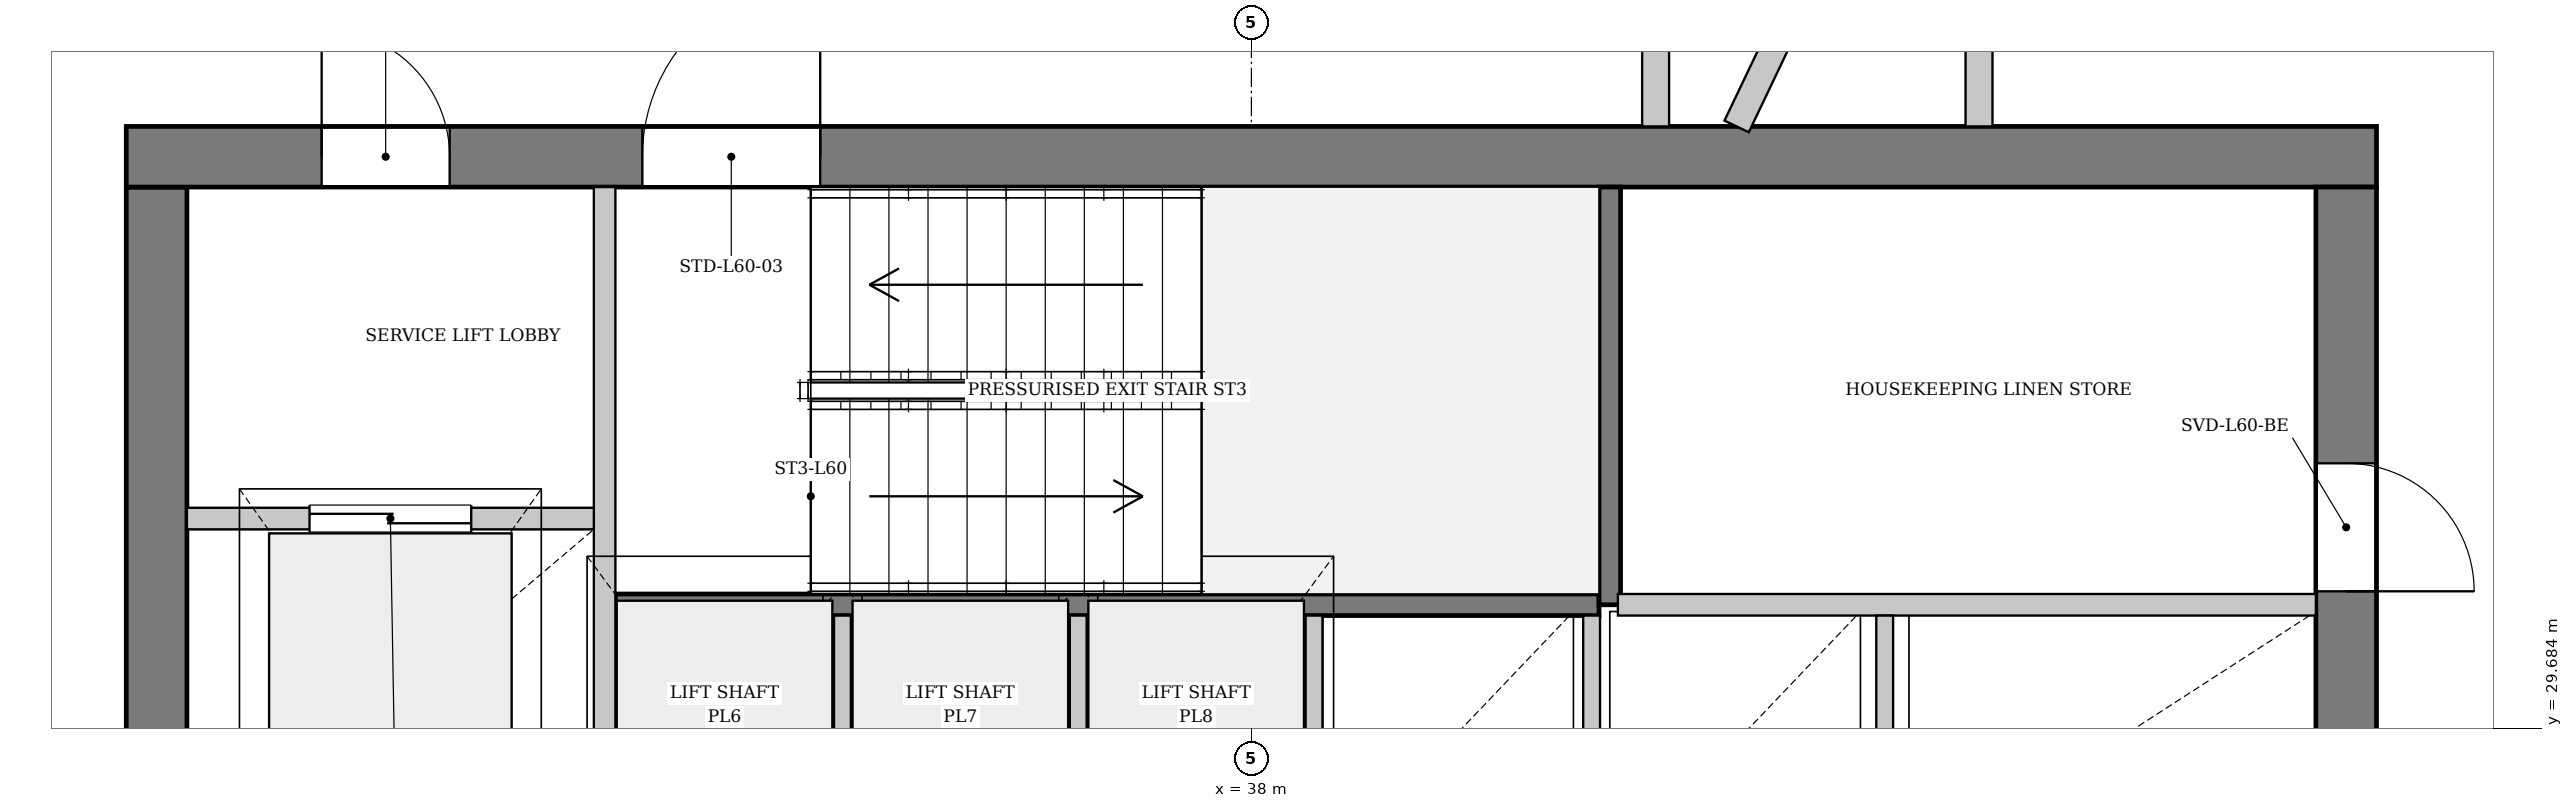
"""IFC4 building model, lengths in metres.
Left out: names, types, materials, properties, quantities, classifications, styles, units other than length and angle.
Written with IfcOpenShell. Run it as: python <this file> out.ifc"""

import sys

from ifc_helpers import new_model, si_unit, direction, frame, frame_2d, origin, place, context, subcontext, project, spatial, rectangle, extrude, source, transform, mapped, element, fill, save


model = new_model("IFC4")
c1 = context("Model", 3, precision=1e-05, world=origin(), true_north=direction((0.0, 1.0)))
c2 = subcontext(c1, "Body", "Model", "MODEL_VIEW")
j1 = project(units=[si_unit("LENGTHUNIT", "METRE"), si_unit("PLANEANGLEUNIT", "RADIAN")], contexts=[c1])
p1 = place(None, origin())
s1 = spatial("IfcSite", under=j1, at=p1, CompositionType="ELEMENT")
p2 = place(p1, origin())
s2 = spatial("IfcBuilding", under=s1, at=p2, CompositionType="ELEMENT")
p3 = place(p2, frame((0.0, 0.0, 227.35)))
s3 = spatial("IfcBuildingStorey", under=s2, at=p3, CompositionType="ELEMENT", Elevation=227.35)
p4 = place(p3, frame((15.539, 30.776, 0.0), z_axis=(0.0, 0.0, 1.0), x_axis=(0.876021364286, 0.482272297892, 0.0)))
e1 = element("IfcWall", 1, at=p4, inside=s3, PredefinedType="SOLIDWALL", context=c2, shape_type="SweptSolid", body=[
    extrude(rectangle(XDim=22.397, YDim=0.38, at=frame_2d((11.199, 0.0))), origin(), (0.0, 0.0, 1.0), 2.822),
])
p5 = place(p4, frame((5.671, 0.0, 0.65)))
e2 = element("IfcOpeningElement", 2, at=p5, cuts=e1, PredefinedType="OPENING", context=c2, shape_type="SweptSolid", body=[
    extrude(rectangle(XDim=1.2, YDim=1.5, at=frame_2d((0.6, 0.75))), frame((0.0, 0.2, 0.0), z_axis=(0.0, -1.0, 0.0), x_axis=(1.0, 0.0, 0.0)), (0.0, 0.0, 1.0), 0.4),
])
p6 = place(p4, frame((15.526, 0.0, 0.65)))
e3 = element("IfcOpeningElement", 3, at=p6, cuts=e1, PredefinedType="OPENING", context=c2, shape_type="SweptSolid", body=[
    extrude(rectangle(XDim=1.2, YDim=1.5, at=frame_2d((0.6, 0.75))), frame((0.0, 0.2, 0.0), z_axis=(0.0, -1.0, 0.0), x_axis=(1.0, 0.0, 0.0)), (0.0, 0.0, 1.0), 0.4),
])
p7 = place(p3, frame((29.875, 19.5, 0.0), z_axis=(0.0, 0.0, 1.0), x_axis=(0.0, 1.0, 0.0)))
e4 = element("IfcWall", 4, at=p7, inside=s3, PredefinedType="SHEAR", context=c2, shape_type="SweptSolid", body=[
    extrude(rectangle(XDim=14.2, YDim=0.45, at=frame_2d((7.1, 0.0))), origin(), (0.0, 0.0, 1.0), 3.33),
])
p8 = place(p7, frame((7.42, 0.0, 0.0)))
e5 = element("IfcOpeningElement", 5, at=p8, cuts=e4, PredefinedType="OPENING", context=c2, shape_type="SweptSolid", body=[
    extrude(rectangle(XDim=1.6, YDim=2.2, at=frame_2d((0.8, 1.1))), frame((0.0, 0.235, 0.0), z_axis=(0.0, -1.0, 0.0), x_axis=(1.0, 0.0, 0.0)), (0.0, 0.0, 1.0), 0.47),
])
p9 = place(p3, frame((29.65, 33.925, 0.0), z_axis=(0.0, 0.0, 1.0), x_axis=(1.0, 0.0, 0.0)))
e6 = element("IfcWall", 6, at=p9, inside=s3, PredefinedType="SHEAR", context=c2, shape_type="SweptSolid", body=[
    extrude(rectangle(XDim=16.7, YDim=0.45, at=frame_2d((8.35, 0.0))), origin(), (0.0, 0.0, 1.0), 3.33),
])
p10 = place(p9, frame((1.45, 0.0, 0.0)))
e7 = element("IfcOpeningElement", 7, at=p10, cuts=e6, PredefinedType="OPENING", context=c2, shape_type="SweptSolid", body=[
    extrude(rectangle(XDim=0.95, YDim=2.1, at=frame_2d((0.475, 1.05))), frame((0.0, 0.235, 0.0), z_axis=(0.0, -1.0, 0.0), x_axis=(1.0, 0.0, 0.0)), (0.0, 0.0, 1.0), 0.47),
])
p11 = place(p9, frame((3.83, 0.0, 0.0)))
e8 = element("IfcOpeningElement", 8, at=p11, cuts=e6, PredefinedType="OPENING", context=c2, shape_type="SweptSolid", body=[
    extrude(rectangle(XDim=1.32, YDim=2.2, at=frame_2d((0.66, 1.1))), frame((0.0, 0.235, 0.0), z_axis=(0.0, -1.0, 0.0), x_axis=(1.0, 0.0, 0.0)), (0.0, 0.0, 1.0), 0.47),
])
p12 = place(p3, frame((46.125, 33.7, 0.0), z_axis=(0.0, 0.0, 1.0), x_axis=(0.0, -1.0, 0.0)))
e9 = element("IfcWall", 9, at=p12, inside=s3, PredefinedType="SHEAR", context=c2, shape_type="SweptSolid", body=[
    extrude(rectangle(XDim=14.2, YDim=0.45, at=frame_2d((7.1, 0.0))), origin(), (0.0, 0.0, 1.0), 3.33),
])
p13 = place(p12, frame((5.18, 0.0, 0.0)))
e10 = element("IfcOpeningElement", 10, at=p13, cuts=e9, PredefinedType="OPENING", context=c2, shape_type="SweptSolid", body=[
    extrude(rectangle(XDim=1.6, YDim=2.2, at=frame_2d((0.8, 1.1))), frame((0.0, 0.235, 0.0), z_axis=(0.0, -1.0, 0.0), x_axis=(1.0, 0.0, 0.0)), (0.0, 0.0, 1.0), 0.47),
])
p14 = place(p12, frame((2.05, 0.0, 0.0)))
e11 = element("IfcOpeningElement", 11, at=p14, cuts=e9, PredefinedType="OPENING", context=c2, shape_type="SweptSolid", body=[
    extrude(rectangle(XDim=0.95, YDim=2.1, at=frame_2d((0.475, 1.05))), frame((0.0, 0.235, 0.0), z_axis=(0.0, -1.0, 0.0), x_axis=(1.0, 0.0, 0.0)), (0.0, 0.0, 1.0), 0.47),
])
p15 = place(p3, frame((33.28, 30.6, 0.0), z_axis=(0.0, 0.0, 1.0), x_axis=(1.0, 0.0, 0.0)))
e12 = element("IfcWall", 12, at=p15, inside=s3, PredefinedType="PARTITIONING", context=c2, shape_type="SweptSolid", body=[
    extrude(rectangle(XDim=7.3, YDim=0.16, at=frame_2d((3.65, 0.0))), origin(), (0.0, 0.0, 1.0), 3.33),
])
p16 = place(p3, frame((40.66, 30.6, 0.0), z_axis=(0.0, 0.0, 1.0), x_axis=(0.0, 1.0, 0.0)))
e13 = element("IfcWall", 13, at=p16, inside=s3, PredefinedType="PARTITIONING", context=c2, shape_type="SweptSolid", body=[
    extrude(rectangle(XDim=3.1, YDim=0.16, at=frame_2d((1.55, 0.0))), origin(), (0.0, 0.0, 1.0), 3.33),
])
p17 = place(p3, frame((33.2, 28.44, 0.0), z_axis=(0.0, 0.0, 1.0), x_axis=(0.0, 1.0, 0.0)))
e14 = element("IfcWall", 14, at=p17, inside=s3, PredefinedType="PARTITIONING", context=c2, shape_type="SweptSolid", body=[
    extrude(rectangle(XDim=5.26, YDim=0.16, at=frame_2d((2.63, 0.0))), origin(), (0.0, 0.0, 1.0), 3.33),
])
p18 = place(p3, frame((30.1, 31.24, 0.0), z_axis=(0.0, 0.0, 1.0), x_axis=(1.0, 0.0, 0.0)))
e15 = element("IfcWall", 15, at=p18, inside=s3, PredefinedType="PARTITIONING", context=c2, shape_type="SweptSolid", body=[
    extrude(rectangle(XDim=3.02, YDim=0.16, at=frame_2d((1.51, 0.0))), origin(), (0.0, 0.0, 1.0), 3.33),
])
p19 = place(p18, frame((0.91, 0.0, 0.0)))
e16 = element("IfcOpeningElement", 16, at=p19, cuts=e15, PredefinedType="OPENING", context=c2, shape_type="SweptSolid", body=[
    extrude(rectangle(XDim=1.2, YDim=2.2, at=frame_2d((0.6, 1.1))), frame((0.0, 0.09, 0.0), z_axis=(0.0, -1.0, 0.0), x_axis=(1.0, 0.0, 0.0)), (0.0, 0.0, 1.0), 0.18),
])
p20 = place(p3, frame((40.72, 30.6, 0.0), z_axis=(0.0, 0.0, 1.0), x_axis=(1.0, 0.0, 0.0)))
e17 = element("IfcWall", 17, at=p20, inside=s3, PredefinedType="PARTITIONING", context=c2, shape_type="SweptSolid", body=[
    extrude(rectangle(XDim=5.18, YDim=0.16, at=frame_2d((2.59, 0.0))), origin(), (0.0, 0.0, 1.0), 3.33),
])
for number, where, z_axis, x_axis in (
    (18, (34.965, 28.6, 0.0), (0.0, 0.0, 1.0), (0.0, 1.0, 0.0)),
    (19, (36.715, 28.6, 0.0), (0.0, 0.0, 1.0), (0.0, 1.0, 0.0)),
    (20, (38.465, 28.6, 0.0), (0.0, 0.0, 1.0), (0.0, 1.0, 0.0)),
    (21, (40.525, 28.6, 0.0), (0.0, 0.0, 1.0), (0.0, 1.0, 0.0)),
    (22, (42.7, 28.6, 0.0), (0.0, 0.0, 1.0), (0.0, 1.0, 0.0)),
):
    element("IfcWall", number, at=place(p3, frame(where, z_axis=z_axis, x_axis=x_axis)), inside=s3, PredefinedType="PARTITIONING", context=c2, shape_type="SweptSolid", body=[
        extrude(rectangle(XDim=1.92, YDim=0.125, at=frame_2d((0.96, 0.0))), origin(), (0.0, 0.0, 1.0), 3.33),
    ])
p21 = place(p3, frame((41.601, 34.15, 0.0), z_axis=(0.0, 0.0, 1.0), x_axis=(0.430503610469, 0.902588855112, 0.0)))
e23 = element("IfcWall", 23, at=p21, inside=s3, PredefinedType="PARTITIONING", context=c2, shape_type="SweptSolid", body=[
    extrude(rectangle(XDim=12.6, YDim=0.2, at=frame_2d((6.3, 0.0))), origin(), (0.0, 0.0, 1.0), 3.33),
])
for number, where, z_axis, x_axis in (
    (24, (41.0, 34.15, 0.0), (0.0, 0.0, 1.0), (0.0, 1.0, 0.0)),
    (25, (43.4, 34.15, 0.0), (0.0, 0.0, 1.0), (0.0, 1.0, 0.0)),
):
    element("IfcWall", number, at=place(p3, frame(where, z_axis=z_axis, x_axis=x_axis)), inside=s3, PredefinedType="PARTITIONING", context=c2, shape_type="SweptSolid", body=[
        extrude(rectangle(XDim=1.85, YDim=0.2, at=frame_2d((0.925, 0.0))), origin(), (0.0, 0.0, 1.0), 3.33),
    ])
m1 = source(origin(), c2, "Body", "SweptSolid", [
    extrude(rectangle(XDim=0.95, YDim=2.1, at=frame_2d((0.475, 1.05))), frame((0.0, 0.025, 0.0), z_axis=(0.0, -1.0, 0.0), x_axis=(1.0, 0.0, 0.0)), (0.0, 0.0, 1.0), 0.05),
])
p22 = place(p10, origin())
e26 = element("IfcDoor", 26, at=p22, inside=s3, OperationType="SINGLE_SWING_LEFT", PredefinedType="DOOR", context=c2, shape_type="MappedRepresentation", body=[
    mapped(m1, transform((0.0, 0.0, 0.0), x_axis=(1.0, 0.0, 0.0), y_axis=(0.0, 1.0, 0.0), z_axis=(0.0, 0.0, 1.0), scale=1.0)),
])
fill(e7, e26)
m2 = source(origin(), c2, "Body", "SweptSolid", [
    extrude(rectangle(XDim=1.32, YDim=2.2, at=frame_2d((0.66, 1.1))), frame((0.0, 0.025, 0.0), z_axis=(0.0, -1.0, 0.0), x_axis=(1.0, 0.0, 0.0)), (0.0, 0.0, 1.0), 0.05),
])
p23 = place(p11, origin())
e27 = element("IfcDoor", 27, at=p23, inside=s3, OperationType="SINGLE_SWING_RIGHT", PredefinedType="DOOR", context=c2, shape_type="MappedRepresentation", body=[
    mapped(m2, transform((0.0, 0.0, 0.0), x_axis=(1.0, 0.0, 0.0), y_axis=(0.0, 1.0, 0.0), z_axis=(0.0, 0.0, 1.0), scale=1.0)),
])
fill(e8, e27)
m3 = source(origin(), c2, "Body", "SweptSolid", [
    extrude(rectangle(XDim=1.2, YDim=2.2, at=frame_2d((0.6, 1.1))), frame((0.0, 0.025, 0.0), z_axis=(0.0, -1.0, 0.0), x_axis=(1.0, 0.0, 0.0)), (0.0, 0.0, 1.0), 0.05),
])
p24 = place(p19, origin())
e28 = element("IfcDoor", 28, at=p24, inside=s3, OperationType="DOUBLE_DOOR_SLIDING", PredefinedType="DOOR", context=c2, shape_type="MappedRepresentation", body=[
    mapped(m3, transform((0.0, 0.0, 0.0), x_axis=(1.0, 0.0, 0.0), y_axis=(0.0, 1.0, 0.0), z_axis=(0.0, 0.0, 1.0), scale=1.0)),
])
fill(e16, e28)
p25 = place(p14, origin())
e29 = element("IfcDoor", 29, at=p25, inside=s3, OperationType="SINGLE_SWING_RIGHT", PredefinedType="DOOR", context=c2, shape_type="MappedRepresentation", body=[
    mapped(m1, transform((0.0, 0.0, 0.0), x_axis=(1.0, 0.0, 0.0), y_axis=(0.0, 1.0, 0.0), z_axis=(0.0, 0.0, 1.0), scale=1.0)),
])
fill(e11, e29)
save(model, sys.argv[1])
